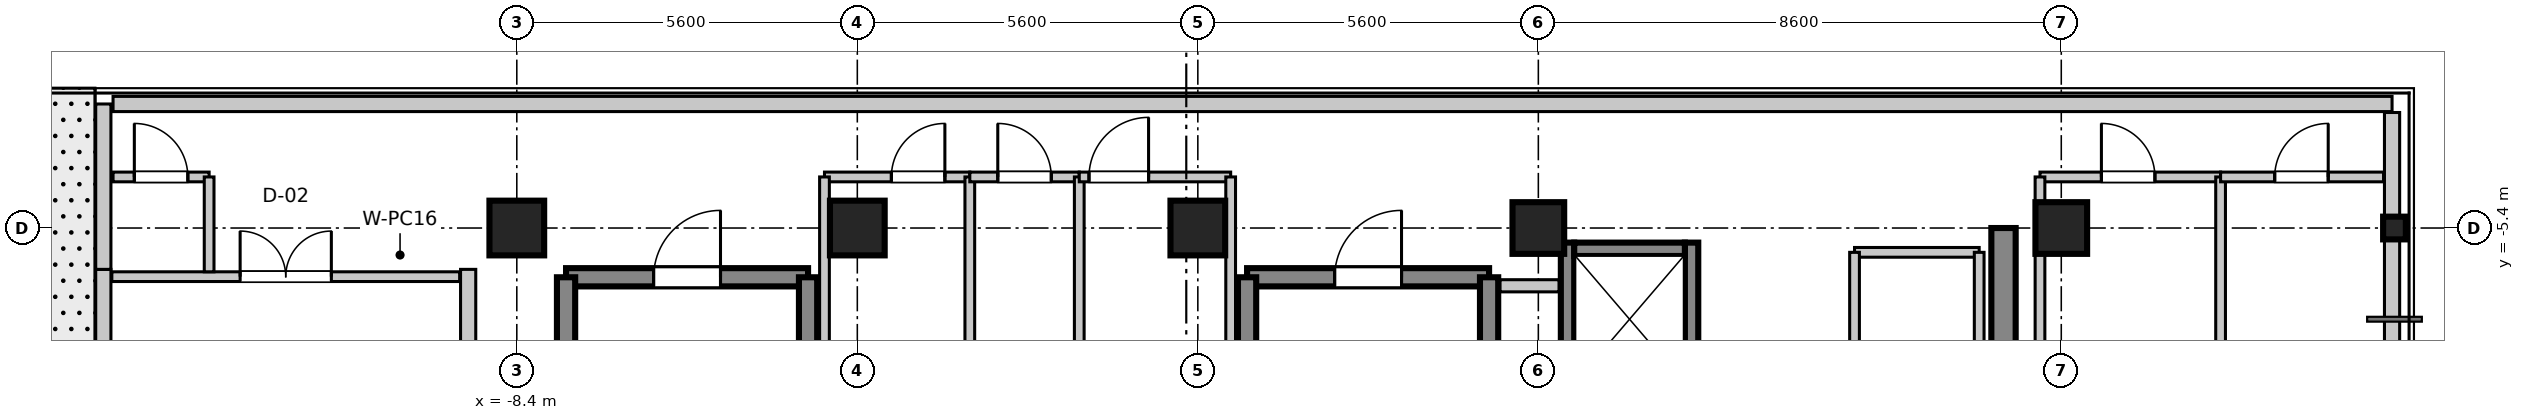
"""IFC4 building model, lengths in metres.
Left out: names, types, materials, properties, quantities, classifications, styles, units other than length and angle.
Written with IfcOpenShell. Run it as: python <this file> out.ifc"""

import sys

from ifc_helpers import new_model, si_unit, direction, frame, frame_2d, origin, origin_2d, place, context, subcontext, project, spatial, rectangle, i_section, extrude, source, transform, mapped, element, fill, save


model = new_model("IFC4")
c1 = context("Model", 3, precision=1e-05, world=origin(), true_north=direction((0.0, 1.0)))
c2 = subcontext(c1, "Body", "Model", "MODEL_VIEW")
j1 = project(units=[si_unit("LENGTHUNIT", "METRE"), si_unit("PLANEANGLEUNIT", "RADIAN")], contexts=[c1])
p1 = place(None, origin())
s1 = spatial("IfcSite", under=j1, at=p1, CompositionType="ELEMENT")
p2 = place(p1, origin())
s2 = spatial("IfcBuilding", under=s1, at=p2, CompositionType="ELEMENT")
p3 = place(p2, frame((0.0, 0.0, 300.35)))
s3 = spatial("IfcBuildingStorey", under=s2, at=p3, CompositionType="ELEMENT", Elevation=300.35)
m1 = source(origin(), c2, "Body", "SweptSolid", [
    extrude(rectangle(XDim=0.9, YDim=0.9, at=origin_2d()), origin(), (0.0, 0.0, 1.0), 3.805),
])
for number, where, z_axis, x_axis in (
    (1, (-8.4, -5.4, 0.0), (0.0, 0.0, 1.0), (1.0, 0.0, 0.0)),
    (2, (-2.8, -5.4, 0.0), (0.0, 0.0, 1.0), (1.0, 0.0, 0.0)),
    (3, (2.8, -5.4, 0.0), (0.0, 0.0, 1.0), (1.0, 0.0, 0.0)),
):
    element("IfcColumn", number, at=place(p3, frame(where, z_axis=z_axis, x_axis=x_axis)), inside=s3, PredefinedType="COLUMN", context=c2, shape_type="MappedRepresentation", body=[
        mapped(m1, transform((0.0, 0.0, 0.0), scale=1.0)),
    ])
m2 = source(origin(), c2, "Body", "SweptSolid", [
    extrude(rectangle(XDim=0.85, YDim=0.85, at=origin_2d()), origin(), (0.0, 0.0, 1.0), 3.805),
])
for number, where, z_axis, x_axis in (
    (4, (8.4, -5.4, 0.0), (0.0, 0.0, 1.0), (1.0, 0.0, 0.0)),
    (5, (17.0, -5.4, 0.0), (0.0, 0.0, 1.0), (1.0, 0.0, 0.0)),
):
    element("IfcColumn", number, at=place(p3, frame(where, z_axis=z_axis, x_axis=x_axis)), inside=s3, PredefinedType="PILASTER", context=c2, shape_type="MappedRepresentation", body=[
        mapped(m2, transform((0.0, 0.0, 0.0), scale=1.0)),
    ])
m3 = source(origin(), c2, "Body", "SweptSolid", [
    extrude(i_section(OverallWidth=0.374, OverallDepth=0.374, WebThickness=0.014, FlangeThickness=0.023, at=origin_2d()), origin(), (0.0, 0.0, 1.0), 3.805),
])
p4 = place(p3, frame((22.48, -5.4, 0.0), z_axis=(0.0, 0.0, 1.0), x_axis=(1.0, 0.0, 0.0)))
e6 = element("IfcColumn", 6, at=p4, inside=s3, PredefinedType="COLUMN", context=c2, shape_type="MappedRepresentation", body=[
    mapped(m3, transform((0.0, 0.0, 0.0), scale=1.0)),
])
m4 = source(origin(), c2, "Body", "SweptSolid", [
    extrude(rectangle(XDim=11.6, YDim=0.4, at=frame_2d((5.8, 0.0))), origin(), (0.0, 0.0, 1.0), 3.55),
])
p5 = place(p3, frame((16.05, -17.0, 0.0), z_axis=(0.0, 0.0, 1.0), x_axis=(0.0, 1.0, 0.0)))
e7 = element("IfcWall", 7, at=p5, inside=s3, PredefinedType="SHEAR", context=c2, shape_type="MappedRepresentation", body=[
    mapped(m4, transform((0.0, 0.0, 0.0), scale=1.0)),
])
m5 = source(origin(), c2, "Body", "SweptSolid", [
    extrude(rectangle(XDim=3.98, YDim=0.3, at=frame_2d((1.99, 0.0))), origin(), (0.0, 0.0, 1.0), 3.55),
])
p6 = place(p3, frame((3.61, -6.21, 0.0), z_axis=(0.0, 0.0, 1.0), x_axis=(1.0, 0.0, 0.0)))
e8 = element("IfcWall", 8, at=p6, inside=s3, PredefinedType="SHEAR", context=c2, shape_type="MappedRepresentation", body=[
    mapped(m5, transform((0.0, 0.0, 0.0), scale=1.0)),
])
p7 = place(p6, frame((1.44, 0.0, 0.0)))
e9 = element("IfcOpeningElement", 9, at=p7, cuts=e8, PredefinedType="OPENING", context=c2, shape_type="SweptSolid", body=[
    extrude(rectangle(XDim=1.1, YDim=2.15, at=frame_2d((0.55, 1.075))), frame((0.0, 0.16, 0.0), z_axis=(0.0, -1.0, 0.0), x_axis=(1.0, 0.0, 0.0)), (0.0, 0.0, 1.0), 0.32),
])
m6 = source(origin(), c2, "Body", "SweptSolid", [
    extrude(rectangle(XDim=9.38, YDim=0.3, at=frame_2d((4.69, 0.0))), origin(), (0.0, 0.0, 1.0), 3.55),
])
for number, where, z_axis, x_axis in (
    (10, (3.61, -15.59, 0.0), (0.0, 0.0, 1.0), (0.0, 1.0, 0.0)),
    (11, (7.59, -15.59, 0.0), (0.0, 0.0, 1.0), (0.0, 1.0, 0.0)),
):
    element("IfcWall", number, at=place(p3, frame(where, z_axis=z_axis, x_axis=x_axis)), inside=s3, PredefinedType="SHEAR", context=c2, shape_type="MappedRepresentation", body=[
        mapped(m6, transform((0.0, 0.0, 0.0), scale=1.0)),
    ])
p8 = place(p3, frame((-7.59, -6.21, 0.0), z_axis=(0.0, 0.0, 1.0), x_axis=(1.0, 0.0, 0.0)))
e12 = element("IfcWall", 12, at=p8, inside=s3, PredefinedType="SHEAR", context=c2, shape_type="MappedRepresentation", body=[
    mapped(m5, transform((0.0, 0.0, 0.0), scale=1.0)),
])
p9 = place(p8, frame((1.44, 0.0, 0.0)))
e13 = element("IfcOpeningElement", 13, at=p9, cuts=e12, PredefinedType="OPENING", context=c2, shape_type="SweptSolid", body=[
    extrude(rectangle(XDim=1.1, YDim=2.15, at=frame_2d((0.55, 1.075))), frame((0.0, 0.16, 0.0), z_axis=(0.0, -1.0, 0.0), x_axis=(1.0, 0.0, 0.0)), (0.0, 0.0, 1.0), 0.32),
])
for number, where, z_axis, x_axis in (
    (14, (-7.59, -15.59, 0.0), (0.0, 0.0, 1.0), (0.0, 1.0, 0.0)),
    (15, (-3.61, -15.59, 0.0), (0.0, 0.0, 1.0), (0.0, 1.0, 0.0)),
):
    element("IfcWall", number, at=place(p3, frame(where, z_axis=z_axis, x_axis=x_axis)), inside=s3, PredefinedType="SHEAR", context=c2, shape_type="MappedRepresentation", body=[
        mapped(m6, transform((0.0, 0.0, 0.0), scale=1.0)),
    ])
m7 = source(origin(), c2, "Body", "SweptSolid", [
    extrude(rectangle(XDim=2.36, YDim=0.22, at=frame_2d((1.18, 0.0))), origin(), (0.0, 0.0, 1.0), 3.55),
])
for number, where, z_axis, x_axis in (
    (16, (8.88, -8.0, 0.0), (0.0, 0.0, 1.0), (0.0, 1.0, 0.0)),
    (17, (10.92, -8.0, 0.0), (0.0, 0.0, 1.0), (0.0, 1.0, 0.0)),
):
    element("IfcWall", number, at=place(p3, frame(where, z_axis=z_axis, x_axis=x_axis)), inside=s3, PredefinedType="SHEAR", context=c2, shape_type="MappedRepresentation", body=[
        mapped(m7, transform((0.0, 0.0, 0.0), scale=1.0)),
    ])
m8 = source(origin(), c2, "Body", "SweptSolid", [
    extrude(rectangle(XDim=1.82, YDim=0.22, at=frame_2d((0.91, 0.0))), origin(), (0.0, 0.0, 1.0), 3.55),
])
p10 = place(p3, frame((8.99, -5.75, 0.0), z_axis=(0.0, 0.0, 1.0), x_axis=(1.0, 0.0, 0.0)))
e18 = element("IfcWall", 18, at=p10, inside=s3, PredefinedType="SHEAR", context=c2, shape_type="MappedRepresentation", body=[
    mapped(m8, transform((0.0, 0.0, 0.0), scale=1.0)),
])
m9 = source(origin(), c2, "Body", "SweptSolid", [
    extrude(rectangle(XDim=8.84, YDim=0.25, at=frame_2d((4.42, 0.0))), origin(), (0.0, 0.0, 1.0), 2.99),
])
for number, where, z_axis, x_axis in (
    (19, (-15.2, -14.92, 0.0), (0.0, 0.0, 1.0), (0.0, 1.0, 0.0)),
    (20, (-9.2, -14.92, 0.0), (0.0, 0.0, 1.0), (0.0, 1.0, 0.0)),
):
    element("IfcWall", number, at=place(p3, frame(where, z_axis=z_axis, x_axis=x_axis)), inside=s3, PredefinedType="STANDARD", context=c2, shape_type="MappedRepresentation", body=[
        mapped(m9, transform((0.0, 0.0, 0.0), scale=1.0)),
    ])
m10 = source(origin(), c2, "Body", "SweptSolid", [
    extrude(rectangle(XDim=0.97, YDim=0.2, at=frame_2d((0.485, 0.0))), origin(), (0.0, 0.0, 1.0), 2.89),
])
p11 = place(p3, frame((7.77, -6.35, 0.0), z_axis=(0.0, 0.0, 1.0), x_axis=(1.0, 0.0, 0.0)))
e21 = element("IfcWall", 21, at=p11, inside=s3, PredefinedType="PARTITIONING", context=c2, shape_type="MappedRepresentation", body=[
    mapped(m10, transform((0.0, 0.0, 0.0), scale=1.0)),
])
m11 = source(origin(), c2, "Body", "SweptSolid", [
    extrude(rectangle(XDim=37.48, YDim=0.25, at=frame_2d((18.74, 0.0))), origin(), (0.0, 0.0, 1.0), 2.89),
])
p12 = place(p3, frame((-15.04, -3.36, 0.0), z_axis=(0.0, 0.0, 1.0), x_axis=(1.0, 0.0, 0.0)))
e22 = element("IfcWall", 22, at=p12, inside=s3, PredefinedType="STANDARD", context=c2, shape_type="MappedRepresentation", body=[
    mapped(m11, transform((0.0, 0.0, 0.0), scale=1.0)),
])
m12 = source(origin(), c2, "Body", "SweptSolid", [
    extrude(rectangle(XDim=2.72, YDim=0.25, at=frame_2d((1.36, 0.0))), origin(), (0.0, 0.0, 1.0), 2.89),
])
p13 = place(p3, frame((-15.2, -6.08, 0.0), z_axis=(0.0, 0.0, 1.0), x_axis=(0.0, 1.0, 0.0)))
e23 = element("IfcWall", 23, at=p13, inside=s3, PredefinedType="STANDARD", context=c2, shape_type="MappedRepresentation", body=[
    mapped(m12, transform((0.0, 0.0, 0.0), scale=1.0)),
])
m13 = source(origin(), c2, "Body", "SweptSolid", [
    extrude(rectangle(XDim=16.12, YDim=0.25, at=frame_2d((8.06, 0.0))), origin(), (0.0, 0.0, 1.0), 2.89),
])
p14 = place(p3, frame((22.44, -19.62, 0.0), z_axis=(0.0, 0.0, 1.0), x_axis=(0.0, 1.0, 0.0)))
e24 = element("IfcWall", 24, at=p14, inside=s3, PredefinedType="STANDARD", context=c2, shape_type="MappedRepresentation", body=[
    mapped(m13, transform((0.0, 0.0, 0.0), scale=1.0)),
])
m14 = source(origin(), c2, "Body", "SweptSolid", [
    extrude(rectangle(XDim=2.05, YDim=0.16, at=frame_2d((1.025, 0.0))), origin(), (0.0, 0.0, 1.0), 2.89),
])
p15 = place(p3, frame((13.6, -5.8, 0.0), z_axis=(0.0, 0.0, 1.0), x_axis=(1.0, 0.0, 0.0)))
e25 = element("IfcWall", 25, at=p15, inside=s3, PredefinedType="PARTITIONING", context=c2, shape_type="MappedRepresentation", body=[
    mapped(m14, transform((0.0, 0.0, 0.0), scale=1.0)),
])
m15 = source(origin(), c2, "Body", "SweptSolid", [
    extrude(rectangle(XDim=4.35, YDim=0.16, at=frame_2d((2.175, 0.0))), origin(), (0.0, 0.0, 1.0), 2.89),
])
p16 = place(p3, frame((13.6, -10.15, 0.0), z_axis=(0.0, 0.0, 1.0), x_axis=(0.0, 1.0, 0.0)))
e26 = element("IfcWall", 26, at=p16, inside=s3, PredefinedType="PARTITIONING", context=c2, shape_type="MappedRepresentation", body=[
    mapped(m15, transform((0.0, 0.0, 0.0), scale=1.0)),
])
p17 = place(p16, frame((1.76, 0.0, 0.0)))
e27 = element("IfcOpeningElement", 27, at=p17, cuts=e26, PredefinedType="OPENING", context=c2, shape_type="SweptSolid", body=[
    extrude(rectangle(XDim=0.88, YDim=2.1, at=frame_2d((0.44, 1.05))), frame((0.0, 0.09, 0.0), z_axis=(0.0, -1.0, 0.0), x_axis=(1.0, 0.0, 0.0)), (0.0, 0.0, 1.0), 0.18),
])
p18 = place(p3, frame((15.65, -10.15, 0.0), z_axis=(0.0, 0.0, 1.0), x_axis=(0.0, 1.0, 0.0)))
e28 = element("IfcWall", 28, at=p18, inside=s3, PredefinedType="PARTITIONING", context=c2, shape_type="MappedRepresentation", body=[
    mapped(m15, transform((0.0, 0.0, 0.0), scale=1.0)),
])
m16 = source(origin(), c2, "Body", "SweptSolid", [
    extrude(rectangle(XDim=5.72, YDim=0.16, at=frame_2d((2.86, 0.0))), origin(), (0.0, 0.0, 1.0), 2.89),
])
p19 = place(p3, frame((-15.06, -6.2, 0.0), z_axis=(0.0, 0.0, 1.0), x_axis=(1.0, 0.0, 0.0)))
e29 = element("IfcWall", 29, at=p19, inside=s3, PredefinedType="PARTITIONING", context=c2, shape_type="MappedRepresentation", body=[
    mapped(m16, transform((0.0, 0.0, 0.0), scale=1.0)),
])
p20 = place(p19, frame((2.11, 0.0, 0.0)))
e30 = element("IfcOpeningElement", 30, at=p20, cuts=e29, PredefinedType="OPENING", context=c2, shape_type="SweptSolid", body=[
    extrude(rectangle(XDim=1.5, YDim=2.15, at=frame_2d((0.75, 1.075))), frame((0.0, 0.09, 0.0), z_axis=(0.0, -1.0, 0.0), x_axis=(1.0, 0.0, 0.0)), (0.0, 0.0, 1.0), 0.18),
])
m17 = source(origin(), c2, "Body", "SweptSolid", [
    extrude(rectangle(XDim=1.58, YDim=0.16, at=frame_2d((0.79, 0.0))), origin(), (0.0, 0.0, 1.0), 2.89),
])
p21 = place(p3, frame((-15.04, -4.56, 0.0), z_axis=(0.0, 0.0, 1.0), x_axis=(1.0, 0.0, 0.0)))
e31 = element("IfcWall", 31, at=p21, inside=s3, PredefinedType="PARTITIONING", context=c2, shape_type="MappedRepresentation", body=[
    mapped(m17, transform((0.0, 0.0, 0.0), scale=1.0)),
])
p22 = place(p21, frame((0.35, 0.0, 0.0)))
e32 = element("IfcOpeningElement", 32, at=p22, cuts=e31, PredefinedType="OPENING", context=c2, shape_type="SweptSolid", body=[
    extrude(rectangle(XDim=0.88, YDim=2.1, at=frame_2d((0.44, 1.05))), frame((0.0, 0.09, 0.0), z_axis=(0.0, -1.0, 0.0), x_axis=(1.0, 0.0, 0.0)), (0.0, 0.0, 1.0), 0.18),
])
m18 = source(origin(), c2, "Body", "SweptSolid", [
    extrude(rectangle(XDim=1.56, YDim=0.16, at=frame_2d((0.78, 0.0))), origin(), (0.0, 0.0, 1.0), 2.89),
])
p23 = place(p3, frame((-13.46, -6.12, 0.0), z_axis=(0.0, 0.0, 1.0), x_axis=(0.0, 1.0, 0.0)))
e33 = element("IfcWall", 33, at=p23, inside=s3, PredefinedType="PARTITIONING", context=c2, shape_type="MappedRepresentation", body=[
    mapped(m18, transform((0.0, 0.0, 0.0), scale=1.0)),
])
m19 = source(origin(), c2, "Body", "SweptSolid", [
    extrude(rectangle(XDim=2.39, YDim=0.16, at=frame_2d((1.195, 0.0))), origin(), (0.0, 0.0, 1.0), 2.89),
])
p24 = place(p3, frame((-3.34, -4.56, 0.0), z_axis=(0.0, 0.0, 1.0), x_axis=(1.0, 0.0, 0.0)))
e34 = element("IfcWall", 34, at=p24, inside=s3, PredefinedType="PARTITIONING", context=c2, shape_type="MappedRepresentation", body=[
    mapped(m19, transform((0.0, 0.0, 0.0), scale=1.0)),
])
p25 = place(p24, frame((1.1, 0.0, 0.0)))
e35 = element("IfcOpeningElement", 35, at=p25, cuts=e34, PredefinedType="OPENING", context=c2, shape_type="SweptSolid", body=[
    extrude(rectangle(XDim=0.88, YDim=2.1, at=frame_2d((0.44, 1.05))), frame((0.0, 0.09, 0.0), z_axis=(0.0, -1.0, 0.0), x_axis=(1.0, 0.0, 0.0)), (0.0, 0.0, 1.0), 0.18),
])
m20 = source(origin(), c2, "Body", "SweptSolid", [
    extrude(rectangle(XDim=11.26, YDim=0.16, at=frame_2d((5.63, 0.0))), origin(), (0.0, 0.0, 1.0), 2.89),
])
p26 = place(p3, frame((-3.34, -15.82, 0.0), z_axis=(0.0, 0.0, 1.0), x_axis=(0.0, 1.0, 0.0)))
e36 = element("IfcWall", 36, at=p26, inside=s3, PredefinedType="PARTITIONING", context=c2, shape_type="MappedRepresentation", body=[
    mapped(m20, transform((0.0, 0.0, 0.0), scale=1.0)),
])
m21 = source(origin(), c2, "Body", "SweptSolid", [
    extrude(rectangle(XDim=17.74, YDim=0.16, at=frame_2d((8.87, 0.0))), origin(), (0.0, 0.0, 1.0), 2.89),
])
p27 = place(p3, frame((-0.95, -22.3, 0.0), z_axis=(0.0, 0.0, 1.0), x_axis=(0.0, 1.0, 0.0)))
e37 = element("IfcWall", 37, at=p27, inside=s3, PredefinedType="PARTITIONING", context=c2, shape_type="MappedRepresentation", body=[
    mapped(m21, transform((0.0, 0.0, 0.0), scale=1.0)),
])
m22 = source(origin(), c2, "Body", "SweptSolid", [
    extrude(rectangle(XDim=1.8, YDim=0.16, at=frame_2d((0.9, 0.0))), origin(), (0.0, 0.0, 1.0), 2.89),
])
p28 = place(p3, frame((-0.95, -4.56, 0.0), z_axis=(0.0, 0.0, 1.0), x_axis=(1.0, 0.0, 0.0)))
e38 = element("IfcWall", 38, at=p28, inside=s3, PredefinedType="PARTITIONING", context=c2, shape_type="MappedRepresentation", body=[
    mapped(m22, transform((0.0, 0.0, 0.0), scale=1.0)),
])
p29 = place(p28, frame((0.46, 0.0, 0.0)))
e39 = element("IfcOpeningElement", 39, at=p29, cuts=e38, PredefinedType="OPENING", context=c2, shape_type="SweptSolid", body=[
    extrude(rectangle(XDim=0.88, YDim=2.1, at=frame_2d((0.44, 1.05))), frame((0.0, 0.09, 0.0), z_axis=(0.0, -1.0, 0.0), x_axis=(1.0, 0.0, 0.0)), (0.0, 0.0, 1.0), 0.18),
])
p30 = place(p3, frame((0.85, -22.3, 0.0), z_axis=(0.0, 0.0, 1.0), x_axis=(0.0, 1.0, 0.0)))
e40 = element("IfcWall", 40, at=p30, inside=s3, PredefinedType="PARTITIONING", context=c2, shape_type="MappedRepresentation", body=[
    mapped(m21, transform((0.0, 0.0, 0.0), scale=1.0)),
])
m23 = source(origin(), c2, "Body", "SweptSolid", [
    extrude(rectangle(XDim=2.49, YDim=0.16, at=frame_2d((1.245, 0.0))), origin(), (0.0, 0.0, 1.0), 2.89),
])
p31 = place(p3, frame((0.85, -4.56, 0.0), z_axis=(0.0, 0.0, 1.0), x_axis=(1.0, 0.0, 0.0)))
e41 = element("IfcWall", 41, at=p31, inside=s3, PredefinedType="PARTITIONING", context=c2, shape_type="MappedRepresentation", body=[
    mapped(m23, transform((0.0, 0.0, 0.0), scale=1.0)),
])
p32 = place(p31, frame((0.16, 0.0, 0.0)))
e42 = element("IfcOpeningElement", 42, at=p32, cuts=e41, PredefinedType="OPENING", context=c2, shape_type="SweptSolid", body=[
    extrude(rectangle(XDim=0.98, YDim=2.1, at=frame_2d((0.49, 1.05))), frame((0.0, 0.09, 0.0), z_axis=(0.0, -1.0, 0.0), x_axis=(1.0, 0.0, 0.0)), (0.0, 0.0, 1.0), 0.18),
])
p33 = place(p3, frame((3.34, -22.3, 0.0), z_axis=(0.0, 0.0, 1.0), x_axis=(0.0, 1.0, 0.0)))
e43 = element("IfcWall", 43, at=p33, inside=s3, PredefinedType="PARTITIONING", context=c2, shape_type="MappedRepresentation", body=[
    mapped(m21, transform((0.0, 0.0, 0.0), scale=1.0)),
])
m24 = source(origin(), c2, "Body", "SweptSolid", [
    extrude(rectangle(XDim=2.97, YDim=0.16, at=frame_2d((1.485, 0.0))), origin(), (0.0, 0.0, 1.0), 2.89),
])
p34 = place(p3, frame((16.65, -4.56, 0.0), z_axis=(0.0, 0.0, 1.0), x_axis=(1.0, 0.0, 0.0)))
e44 = element("IfcWall", 44, at=p34, inside=s3, PredefinedType="PARTITIONING", context=c2, shape_type="MappedRepresentation", body=[
    mapped(m24, transform((0.0, 0.0, 0.0), scale=1.0)),
])
p35 = place(p34, frame((1.01, 0.0, 0.0)))
e45 = element("IfcOpeningElement", 45, at=p35, cuts=e44, PredefinedType="OPENING", context=c2, shape_type="SweptSolid", body=[
    extrude(rectangle(XDim=0.88, YDim=2.1, at=frame_2d((0.44, 1.05))), frame((0.0, 0.09, 0.0), z_axis=(0.0, -1.0, 0.0), x_axis=(1.0, 0.0, 0.0)), (0.0, 0.0, 1.0), 0.18),
])
for number, where, z_axis, x_axis in (
    (46, (16.65, -22.3, 0.0), (0.0, 0.0, 1.0), (0.0, 1.0, 0.0)),
    (47, (19.62, -22.3, 0.0), (0.0, 0.0, 1.0), (0.0, 1.0, 0.0)),
):
    element("IfcWall", number, at=place(p3, frame(where, z_axis=z_axis, x_axis=x_axis)), inside=s3, PredefinedType="PARTITIONING", context=c2, shape_type="MappedRepresentation", body=[
        mapped(m21, transform((0.0, 0.0, 0.0), scale=1.0)),
    ])
m25 = source(origin(), c2, "Body", "SweptSolid", [
    extrude(rectangle(XDim=2.68, YDim=0.16, at=frame_2d((1.34, 0.0))), origin(), (0.0, 0.0, 1.0), 2.89),
])
p36 = place(p3, frame((19.62, -4.56, 0.0), z_axis=(0.0, 0.0, 1.0), x_axis=(1.0, 0.0, 0.0)))
e48 = element("IfcWall", 48, at=p36, inside=s3, PredefinedType="PARTITIONING", context=c2, shape_type="MappedRepresentation", body=[
    mapped(m25, transform((0.0, 0.0, 0.0), scale=1.0)),
])
p37 = place(p36, frame((0.89, 0.0, 0.0)))
e49 = element("IfcOpeningElement", 49, at=p37, cuts=e48, PredefinedType="OPENING", context=c2, shape_type="SweptSolid", body=[
    extrude(rectangle(XDim=0.88, YDim=2.1, at=frame_2d((0.44, 1.05))), frame((0.0, 0.09, 0.0), z_axis=(0.0, -1.0, 0.0), x_axis=(1.0, 0.0, 0.0)), (0.0, 0.0, 1.0), 0.18),
])
m26 = source(origin(), c2, "Body", "SweptSolid", [
    extrude(rectangle(XDim=1.1, YDim=2.15, at=frame_2d((0.55, 1.075))), frame((0.0, 0.025, 0.0), z_axis=(0.0, -1.0, 0.0), x_axis=(1.0, 0.0, 0.0)), (0.0, 0.0, 1.0), 0.05),
])
p38 = place(p7, frame((1.1, 0.0, 0.0), z_axis=(0.0, 0.0, 1.0), x_axis=(-1.0, 0.0, 0.0)))
e50 = element("IfcDoor", 50, at=p38, inside=s3, OperationType="SINGLE_SWING_RIGHT", PredefinedType="DOOR", context=c2, shape_type="MappedRepresentation", body=[
    mapped(m26, transform((0.0, 0.0, 0.0), scale=1.0)),
])
fill(e9, e50)
p39 = place(p9, frame((1.1, 0.0, 0.0), z_axis=(0.0, 0.0, 1.0), x_axis=(-1.0, 0.0, 0.0)))
e51 = element("IfcDoor", 51, at=p39, inside=s3, OperationType="SINGLE_SWING_RIGHT", PredefinedType="DOOR", context=c2, shape_type="MappedRepresentation", body=[
    mapped(m26, transform((0.0, 0.0, 0.0), scale=1.0)),
])
fill(e13, e51)
m27 = source(origin(), c2, "Body", "SweptSolid", [
    extrude(rectangle(XDim=1.5, YDim=2.15, at=frame_2d((0.75, 1.075))), frame((0.0, 0.025, 0.0), z_axis=(0.0, -1.0, 0.0), x_axis=(1.0, 0.0, 0.0)), (0.0, 0.0, 1.0), 0.05),
])
p40 = place(p20, frame((1.5, 0.0, 0.0), z_axis=(0.0, 0.0, 1.0), x_axis=(-1.0, 0.0, 0.0)))
e52 = element("IfcDoor", 52, at=p40, inside=s3, OperationType="DOUBLE_DOOR_SINGLE_SWING", PredefinedType="DOOR", context=c2, shape_type="MappedRepresentation", body=[
    mapped(m27, transform((0.0, 0.0, 0.0), scale=1.0)),
])
fill(e30, e52)
m28 = source(origin(), c2, "Body", "SweptSolid", [
    extrude(rectangle(XDim=0.88, YDim=2.1, at=frame_2d((0.44, 1.05))), frame((0.0, 0.025, 0.0), z_axis=(0.0, -1.0, 0.0), x_axis=(1.0, 0.0, 0.0)), (0.0, 0.0, 1.0), 0.05),
])
p41 = place(p22, frame((0.88, 0.0, 0.0), z_axis=(0.0, 0.0, 1.0), x_axis=(-1.0, 0.0, 0.0)))
e53 = element("IfcDoor", 53, at=p41, inside=s3, OperationType="SINGLE_SWING_LEFT", PredefinedType="DOOR", context=c2, shape_type="MappedRepresentation", body=[
    mapped(m28, transform((0.0, 0.0, 0.0), scale=1.0)),
])
fill(e32, e53)
p42 = place(p25, frame((0.88, 0.0, 0.0), z_axis=(0.0, 0.0, 1.0), x_axis=(-1.0, 0.0, 0.0)))
e54 = element("IfcDoor", 54, at=p42, inside=s3, OperationType="SINGLE_SWING_RIGHT", PredefinedType="DOOR", context=c2, shape_type="MappedRepresentation", body=[
    mapped(m28, transform((0.0, 0.0, 0.0), scale=1.0)),
])
fill(e35, e54)
p43 = place(p29, frame((0.88, 0.0, 0.0), z_axis=(0.0, 0.0, 1.0), x_axis=(-1.0, 0.0, 0.0)))
e55 = element("IfcDoor", 55, at=p43, inside=s3, OperationType="SINGLE_SWING_LEFT", PredefinedType="DOOR", context=c2, shape_type="MappedRepresentation", body=[
    mapped(m28, transform((0.0, 0.0, 0.0), scale=1.0)),
])
fill(e39, e55)
m29 = source(origin(), c2, "Body", "SweptSolid", [
    extrude(rectangle(XDim=0.98, YDim=2.1, at=frame_2d((0.49, 1.05))), frame((0.0, 0.025, 0.0), z_axis=(0.0, -1.0, 0.0), x_axis=(1.0, 0.0, 0.0)), (0.0, 0.0, 1.0), 0.05),
])
p44 = place(p32, frame((0.98, 0.0, 0.0), z_axis=(0.0, 0.0, 1.0), x_axis=(-1.0, 0.0, 0.0)))
e56 = element("IfcDoor", 56, at=p44, inside=s3, OperationType="SINGLE_SWING_RIGHT", PredefinedType="DOOR", context=c2, shape_type="MappedRepresentation", body=[
    mapped(m29, transform((0.0, 0.0, 0.0), scale=1.0)),
])
fill(e42, e56)
p45 = place(p35, frame((0.88, 0.0, 0.0), z_axis=(0.0, 0.0, 1.0), x_axis=(-1.0, 0.0, 0.0)))
e57 = element("IfcDoor", 57, at=p45, inside=s3, OperationType="SINGLE_SWING_LEFT", PredefinedType="DOOR", context=c2, shape_type="MappedRepresentation", body=[
    mapped(m28, transform((0.0, 0.0, 0.0), scale=1.0)),
])
fill(e45, e57)
p46 = place(p37, frame((0.88, 0.0, 0.0), z_axis=(0.0, 0.0, 1.0), x_axis=(-1.0, 0.0, 0.0)))
e58 = element("IfcDoor", 58, at=p46, inside=s3, OperationType="SINGLE_SWING_RIGHT", PredefinedType="DOOR", context=c2, shape_type="MappedRepresentation", body=[
    mapped(m28, transform((0.0, 0.0, 0.0), scale=1.0)),
])
fill(e49, e58)
save(model, sys.argv[1])
